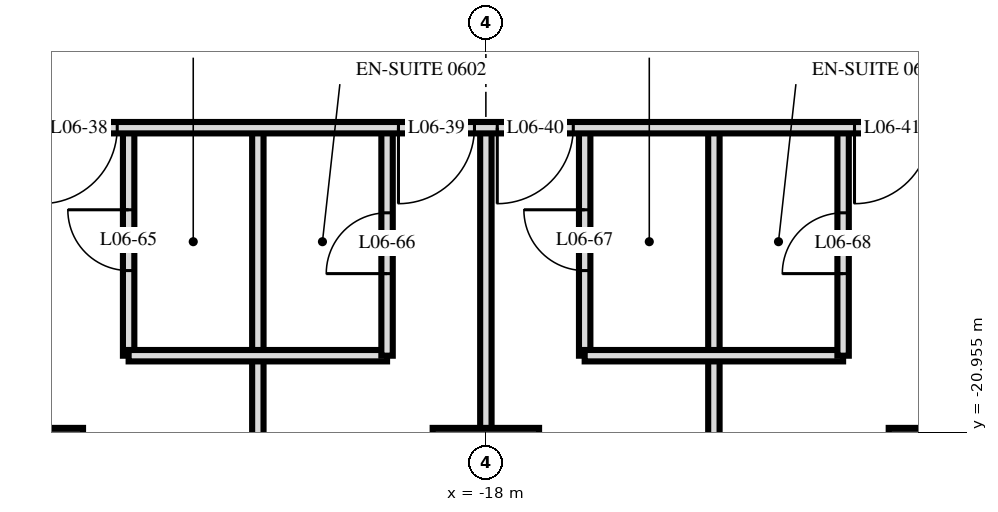
"""IFC4 building model, lengths in metres.
Left out: names, types, materials, properties, quantities, classifications, styles, units other than length and angle.
Written with IfcOpenShell. Run it as: python <this file> out.ifc"""

import sys

from ifc_helpers import new_model, si_unit, direction, frame, frame_2d, origin, origin_2d, place, context, subcontext, project, spatial, rectangle, extrude, element, fill, save


model = new_model("IFC4")
c1 = context("Model", 3, precision=1e-05, world=origin(), true_north=direction((0.0, 1.0)))
c2 = subcontext(c1, "Body", "Model", "MODEL_VIEW")
j1 = project(units=[si_unit("LENGTHUNIT", "METRE"), si_unit("PLANEANGLEUNIT", "RADIAN")], contexts=[c1])
p1 = place(None, origin())
s1 = spatial("IfcSite", under=j1, at=p1, CompositionType="ELEMENT")
p2 = place(p1, origin())
s2 = spatial("IfcBuilding", under=s1, at=p2, CompositionType="ELEMENT")
p3 = place(p2, frame((0.0, 0.0, 31.2)))
s3 = spatial("IfcBuildingStorey", under=s2, at=p3, CompositionType="ELEMENT", Elevation=31.2)
for number, where, z_axis, x_axis in (
    (1, (-24.0, -21.6, 0.0), (0.0, 0.0, 1.0), (1.0, 0.0, 0.0)),
    (2, (-18.0, -21.6, 0.0), (0.0, 0.0, 1.0), (1.0, 0.0, 0.0)),
    (3, (-12.0, -21.6, 0.0), (0.0, 0.0, 1.0), (1.0, 0.0, 0.0)),
):
    element("IfcColumn", number, at=place(p3, frame(where, z_axis=z_axis, x_axis=x_axis)), inside=s3, PredefinedType="COLUMN", context=c2, shape_type="SweptSolid", body=[
        extrude(rectangle(XDim=1.4, YDim=1.4, at=origin_2d()), origin(), (0.0, 0.0, 1.0), 3.6),
    ])
p4 = place(p3, frame((-13.3, -19.95, 0.0), z_axis=(0.0, 0.0, 1.0), x_axis=(0.0, 1.0, 0.0)))
e4 = element("IfcWall", 4, at=p4, inside=s3, PredefinedType="PARTITIONING", context=c2, shape_type="SweptSolid", body=[
    extrude(rectangle(XDim=3.0, YDim=0.15, at=frame_2d((1.5, 0.0))), origin(), (0.0, 0.0, 1.0), 3.32),
])
p5 = place(p4, frame((1.08, 0.0, 0.0)))
e5 = element("IfcOpeningElement", 5, at=p5, cuts=e4, PredefinedType="OPENING", context=c2, shape_type="SweptSolid", body=[
    extrude(rectangle(XDim=0.8, YDim=2.1, at=frame_2d((0.4, 1.05))), frame((0.0, 0.085, 0.0), z_axis=(0.0, -1.0, 0.0), x_axis=(1.0, 0.0, 0.0)), (0.0, 0.0, 1.0), 0.17),
])
p6 = place(p3, frame((-15.0, -29.22, 0.0), z_axis=(0.0, 0.0, 1.0), x_axis=(0.0, 1.0, 0.0)))
e6 = element("IfcWall", 6, at=p6, inside=s3, PredefinedType="PARTITIONING", context=c2, shape_type="SweptSolid", body=[
    extrude(rectangle(XDim=12.27, YDim=0.15, at=frame_2d((6.135, 0.0))), origin(), (0.0, 0.0, 1.0), 3.32),
])
p7 = place(p3, frame((-16.7, -19.95, 0.0), z_axis=(0.0, 0.0, 1.0), x_axis=(0.0, 1.0, 0.0)))
e7 = element("IfcWall", 7, at=p7, inside=s3, PredefinedType="PARTITIONING", context=c2, shape_type="SweptSolid", body=[
    extrude(rectangle(XDim=3.0, YDim=0.15, at=frame_2d((1.5, 0.0))), origin(), (0.0, 0.0, 1.0), 3.32),
])
p8 = place(p7, frame((1.12, 0.0, 0.0)))
e8 = element("IfcOpeningElement", 8, at=p8, cuts=e7, PredefinedType="OPENING", context=c2, shape_type="SweptSolid", body=[
    extrude(rectangle(XDim=0.8, YDim=2.1, at=frame_2d((0.4, 1.05))), frame((0.0, 0.085, 0.0), z_axis=(0.0, -1.0, 0.0), x_axis=(1.0, 0.0, 0.0)), (0.0, 0.0, 1.0), 0.17),
])
p9 = place(p3, frame((-18.0, -29.22, 0.0), z_axis=(0.0, 0.0, 1.0), x_axis=(0.0, 1.0, 0.0)))
e9 = element("IfcWall", 9, at=p9, inside=s3, PredefinedType="PARTITIONING", context=c2, shape_type="SweptSolid", body=[
    extrude(rectangle(XDim=12.27, YDim=0.15, at=frame_2d((6.135, 0.0))), origin(), (0.0, 0.0, 1.0), 3.32),
])
p10 = place(p3, frame((-19.3, -19.95, 0.0), z_axis=(0.0, 0.0, 1.0), x_axis=(0.0, 1.0, 0.0)))
e10 = element("IfcWall", 10, at=p10, inside=s3, PredefinedType="PARTITIONING", context=c2, shape_type="SweptSolid", body=[
    extrude(rectangle(XDim=3.0, YDim=0.15, at=frame_2d((1.5, 0.0))), origin(), (0.0, 0.0, 1.0), 3.32),
])
p11 = place(p10, frame((1.08, 0.0, 0.0)))
e11 = element("IfcOpeningElement", 11, at=p11, cuts=e10, PredefinedType="OPENING", context=c2, shape_type="SweptSolid", body=[
    extrude(rectangle(XDim=0.8, YDim=2.1, at=frame_2d((0.4, 1.05))), frame((0.0, 0.085, 0.0), z_axis=(0.0, -1.0, 0.0), x_axis=(1.0, 0.0, 0.0)), (0.0, 0.0, 1.0), 0.17),
])
p12 = place(p3, frame((-21.0, -29.22, 0.0), z_axis=(0.0, 0.0, 1.0), x_axis=(0.0, 1.0, 0.0)))
e12 = element("IfcWall", 12, at=p12, inside=s3, PredefinedType="PARTITIONING", context=c2, shape_type="SweptSolid", body=[
    extrude(rectangle(XDim=12.27, YDim=0.15, at=frame_2d((6.135, 0.0))), origin(), (0.0, 0.0, 1.0), 3.32),
])
p13 = place(p3, frame((-22.7, -19.95, 0.0), z_axis=(0.0, 0.0, 1.0), x_axis=(0.0, 1.0, 0.0)))
e13 = element("IfcWall", 13, at=p13, inside=s3, PredefinedType="PARTITIONING", context=c2, shape_type="SweptSolid", body=[
    extrude(rectangle(XDim=3.0, YDim=0.15, at=frame_2d((1.5, 0.0))), origin(), (0.0, 0.0, 1.0), 3.32),
])
p14 = place(p13, frame((1.12, 0.0, 0.0)))
e14 = element("IfcOpeningElement", 14, at=p14, cuts=e13, PredefinedType="OPENING", context=c2, shape_type="SweptSolid", body=[
    extrude(rectangle(XDim=0.8, YDim=2.1, at=frame_2d((0.4, 1.05))), frame((0.0, 0.085, 0.0), z_axis=(0.0, -1.0, 0.0), x_axis=(1.0, 0.0, 0.0)), (0.0, 0.0, 1.0), 0.17),
])
for number, where, z_axis, x_axis in (
    (15, (-22.7, -19.95, 0.0), (0.0, 0.0, 1.0), (1.0, 0.0, 0.0)),
    (16, (-16.7, -19.95, 0.0), (0.0, 0.0, 1.0), (1.0, 0.0, 0.0)),
):
    element("IfcWall", number, at=place(p3, frame(where, z_axis=z_axis, x_axis=x_axis)), inside=s3, PredefinedType="PARTITIONING", context=c2, shape_type="SweptSolid", body=[
        extrude(rectangle(XDim=3.4, YDim=0.15, at=frame_2d((1.7, 0.0))), origin(), (0.0, 0.0, 1.0), 3.32),
    ])
p15 = place(p3, frame((-33.12, -16.95, 0.0), z_axis=(0.0, 0.0, 1.0), x_axis=(1.0, 0.0, 0.0)))
e17 = element("IfcWall", 17, at=p15, inside=s3, PredefinedType="PARTITIONING", context=c2, shape_type="SweptSolid", body=[
    extrude(rectangle(XDim=66.24, YDim=0.15, at=frame_2d((33.12, 0.0))), origin(), (0.0, 0.0, 1.0), 3.32),
])
p16 = place(p15, frame((9.27, 0.0, 0.0)))
e18 = element("IfcOpeningElement", 18, at=p16, cuts=e17, PredefinedType="OPENING", context=c2, shape_type="SweptSolid", body=[
    extrude(rectangle(XDim=1.0, YDim=2.1, at=frame_2d((0.5, 1.05))), frame((0.0, 0.085, 0.0), z_axis=(0.0, -1.0, 0.0), x_axis=(1.0, 0.0, 0.0)), (0.0, 0.0, 1.0), 0.17),
])
p17 = place(p15, frame((13.97, 0.0, 0.0)))
e19 = element("IfcOpeningElement", 19, at=p17, cuts=e17, PredefinedType="OPENING", context=c2, shape_type="SweptSolid", body=[
    extrude(rectangle(XDim=1.0, YDim=2.1, at=frame_2d((0.5, 1.05))), frame((0.0, 0.085, 0.0), z_axis=(0.0, -1.0, 0.0), x_axis=(1.0, 0.0, 0.0)), (0.0, 0.0, 1.0), 0.17),
])
p18 = place(p15, frame((15.27, 0.0, 0.0)))
e20 = element("IfcOpeningElement", 20, at=p18, cuts=e17, PredefinedType="OPENING", context=c2, shape_type="SweptSolid", body=[
    extrude(rectangle(XDim=1.0, YDim=2.1, at=frame_2d((0.5, 1.05))), frame((0.0, 0.085, 0.0), z_axis=(0.0, -1.0, 0.0), x_axis=(1.0, 0.0, 0.0)), (0.0, 0.0, 1.0), 0.17),
])
p19 = place(p15, frame((19.97, 0.0, 0.0)))
e21 = element("IfcOpeningElement", 21, at=p19, cuts=e17, PredefinedType="OPENING", context=c2, shape_type="SweptSolid", body=[
    extrude(rectangle(XDim=1.0, YDim=2.1, at=frame_2d((0.5, 1.05))), frame((0.0, 0.085, 0.0), z_axis=(0.0, -1.0, 0.0), x_axis=(1.0, 0.0, 0.0)), (0.0, 0.0, 1.0), 0.17),
])
p20 = place(p15, frame((22.27, 0.0, 0.0)))
e22 = element("IfcOpeningElement", 22, at=p20, cuts=e17, PredefinedType="OPENING", context=c2, shape_type="SweptSolid", body=[
    extrude(rectangle(XDim=1.0, YDim=2.1, at=frame_2d((0.5, 1.05))), frame((0.0, 0.085, 0.0), z_axis=(0.0, -1.0, 0.0), x_axis=(1.0, 0.0, 0.0)), (0.0, 0.0, 1.0), 0.17),
])
p21 = place(p15, frame((28.97, 0.0, 0.0)))
e23 = element("IfcOpeningElement", 23, at=p21, cuts=e17, PredefinedType="OPENING", context=c2, shape_type="SweptSolid", body=[
    extrude(rectangle(XDim=1.0, YDim=2.1, at=frame_2d((0.5, 1.05))), frame((0.0, 0.085, 0.0), z_axis=(0.0, -1.0, 0.0), x_axis=(1.0, 0.0, 0.0)), (0.0, 0.0, 1.0), 0.17),
])
p22 = place(p15, frame((30.27, 0.0, 0.0)))
e24 = element("IfcOpeningElement", 24, at=p22, cuts=e17, PredefinedType="OPENING", context=c2, shape_type="SweptSolid", body=[
    extrude(rectangle(XDim=1.0, YDim=2.1, at=frame_2d((0.5, 1.05))), frame((0.0, 0.085, 0.0), z_axis=(0.0, -1.0, 0.0), x_axis=(1.0, 0.0, 0.0)), (0.0, 0.0, 1.0), 0.17),
])
p23 = place(p15, frame((34.97, 0.0, 0.0)))
e25 = element("IfcOpeningElement", 25, at=p23, cuts=e17, PredefinedType="OPENING", context=c2, shape_type="SweptSolid", body=[
    extrude(rectangle(XDim=1.0, YDim=2.1, at=frame_2d((0.5, 1.05))), frame((0.0, 0.085, 0.0), z_axis=(0.0, -1.0, 0.0), x_axis=(1.0, 0.0, 0.0)), (0.0, 0.0, 1.0), 0.17),
])
p24 = place(p15, frame((36.27, 0.0, 0.0)))
e26 = element("IfcOpeningElement", 26, at=p24, cuts=e17, PredefinedType="OPENING", context=c2, shape_type="SweptSolid", body=[
    extrude(rectangle(XDim=1.0, YDim=2.1, at=frame_2d((0.5, 1.05))), frame((0.0, 0.085, 0.0), z_axis=(0.0, -1.0, 0.0), x_axis=(1.0, 0.0, 0.0)), (0.0, 0.0, 1.0), 0.17),
])
p25 = place(p15, frame((40.97, 0.0, 0.0)))
e27 = element("IfcOpeningElement", 27, at=p25, cuts=e17, PredefinedType="OPENING", context=c2, shape_type="SweptSolid", body=[
    extrude(rectangle(XDim=1.0, YDim=2.1, at=frame_2d((0.5, 1.05))), frame((0.0, 0.085, 0.0), z_axis=(0.0, -1.0, 0.0), x_axis=(1.0, 0.0, 0.0)), (0.0, 0.0, 1.0), 0.17),
])
p26 = place(p15, frame((42.27, 0.0, 0.0)))
e28 = element("IfcOpeningElement", 28, at=p26, cuts=e17, PredefinedType="OPENING", context=c2, shape_type="SweptSolid", body=[
    extrude(rectangle(XDim=1.0, YDim=2.1, at=frame_2d((0.5, 1.05))), frame((0.0, 0.085, 0.0), z_axis=(0.0, -1.0, 0.0), x_axis=(1.0, 0.0, 0.0)), (0.0, 0.0, 1.0), 0.17),
])
p27 = place(p15, frame((46.97, 0.0, 0.0)))
e29 = element("IfcOpeningElement", 29, at=p27, cuts=e17, PredefinedType="OPENING", context=c2, shape_type="SweptSolid", body=[
    extrude(rectangle(XDim=1.0, YDim=2.1, at=frame_2d((0.5, 1.05))), frame((0.0, 0.085, 0.0), z_axis=(0.0, -1.0, 0.0), x_axis=(1.0, 0.0, 0.0)), (0.0, 0.0, 1.0), 0.17),
])
p28 = place(p15, frame((48.27, 0.0, 0.0)))
e30 = element("IfcOpeningElement", 30, at=p28, cuts=e17, PredefinedType="OPENING", context=c2, shape_type="SweptSolid", body=[
    extrude(rectangle(XDim=1.0, YDim=2.1, at=frame_2d((0.5, 1.05))), frame((0.0, 0.085, 0.0), z_axis=(0.0, -1.0, 0.0), x_axis=(1.0, 0.0, 0.0)), (0.0, 0.0, 1.0), 0.17),
])
p29 = place(p15, frame((52.97, 0.0, 0.0)))
e31 = element("IfcOpeningElement", 31, at=p29, cuts=e17, PredefinedType="OPENING", context=c2, shape_type="SweptSolid", body=[
    extrude(rectangle(XDim=1.0, YDim=2.1, at=frame_2d((0.5, 1.05))), frame((0.0, 0.085, 0.0), z_axis=(0.0, -1.0, 0.0), x_axis=(1.0, 0.0, 0.0)), (0.0, 0.0, 1.0), 0.17),
])
p30 = place(p15, frame((54.27, 0.0, 0.0)))
e32 = element("IfcOpeningElement", 32, at=p30, cuts=e17, PredefinedType="OPENING", context=c2, shape_type="SweptSolid", body=[
    extrude(rectangle(XDim=1.0, YDim=2.1, at=frame_2d((0.5, 1.05))), frame((0.0, 0.085, 0.0), z_axis=(0.0, -1.0, 0.0), x_axis=(1.0, 0.0, 0.0)), (0.0, 0.0, 1.0), 0.17),
])
p31 = place(p15, frame((4.4, 0.0, 0.0)))
e33 = element("IfcOpeningElement", 33, at=p31, cuts=e17, PredefinedType="OPENING", context=c2, shape_type="SweptSolid", body=[
    extrude(rectangle(XDim=1.0, YDim=2.1, at=frame_2d((0.5, 1.05))), frame((0.0, 0.085, 0.0), z_axis=(0.0, -1.0, 0.0), x_axis=(1.0, 0.0, 0.0)), (0.0, 0.0, 1.0), 0.17),
])
p32 = place(p15, frame((60.8, 0.0, 0.0)))
e34 = element("IfcOpeningElement", 34, at=p32, cuts=e17, PredefinedType="OPENING", context=c2, shape_type="SweptSolid", body=[
    extrude(rectangle(XDim=1.0, YDim=2.1, at=frame_2d((0.5, 1.05))), frame((0.0, 0.085, 0.0), z_axis=(0.0, -1.0, 0.0), x_axis=(1.0, 0.0, 0.0)), (0.0, 0.0, 1.0), 0.17),
])
p33 = place(p16, frame((0.5, 0.0, 0.0), z_axis=(0.0, 0.0, 1.0), x_axis=(-1.0, 0.0, 0.0)))
e35 = element("IfcDoor", 35, at=p33, inside=s3, OperationType="SINGLE_SWING_LEFT", PredefinedType="DOOR", context=c2, shape_type="SweptSolid", body=[
    extrude(rectangle(XDim=1.0, YDim=2.1, at=frame_2d((0.0, 1.05))), frame((0.0, -0.025, 0.0), z_axis=(0.0, 1.0, 0.0), x_axis=(-1.0, 0.0, 0.0)), (0.0, 0.0, 1.0), 0.05),
])
fill(e18, e35)
p34 = place(p17, frame((0.5, 0.0, 0.0), z_axis=(0.0, 0.0, 1.0), x_axis=(-1.0, 0.0, 0.0)))
e36 = element("IfcDoor", 36, at=p34, inside=s3, OperationType="SINGLE_SWING_LEFT", PredefinedType="DOOR", context=c2, shape_type="SweptSolid", body=[
    extrude(rectangle(XDim=1.0, YDim=2.1, at=frame_2d((0.0, 1.05))), frame((0.0, -0.025, 0.0), z_axis=(0.0, 1.0, 0.0), x_axis=(-1.0, 0.0, 0.0)), (0.0, 0.0, 1.0), 0.05),
])
fill(e19, e36)
p35 = place(p18, frame((0.5, 0.0, 0.0), z_axis=(0.0, 0.0, 1.0), x_axis=(-1.0, 0.0, 0.0)))
e37 = element("IfcDoor", 37, at=p35, inside=s3, OperationType="SINGLE_SWING_LEFT", PredefinedType="DOOR", context=c2, shape_type="SweptSolid", body=[
    extrude(rectangle(XDim=1.0, YDim=2.1, at=frame_2d((0.0, 1.05))), frame((0.0, -0.025, 0.0), z_axis=(0.0, 1.0, 0.0), x_axis=(-1.0, 0.0, 0.0)), (0.0, 0.0, 1.0), 0.05),
])
fill(e20, e37)
p36 = place(p19, frame((0.5, 0.0, 0.0), z_axis=(0.0, 0.0, 1.0), x_axis=(-1.0, 0.0, 0.0)))
e38 = element("IfcDoor", 38, at=p36, inside=s3, OperationType="SINGLE_SWING_LEFT", PredefinedType="DOOR", context=c2, shape_type="SweptSolid", body=[
    extrude(rectangle(XDim=1.0, YDim=2.1, at=frame_2d((0.0, 1.05))), frame((0.0, -0.025, 0.0), z_axis=(0.0, 1.0, 0.0), x_axis=(-1.0, 0.0, 0.0)), (0.0, 0.0, 1.0), 0.05),
])
fill(e21, e38)
p37 = place(p14, origin())
e39 = element("IfcDoor", 39, at=p37, inside=s3, OperationType="SINGLE_SWING_LEFT", PredefinedType="DOOR", context=c2, shape_type="SweptSolid", body=[
    extrude(rectangle(XDim=0.8, YDim=2.1, at=frame_2d((0.4, 1.05))), frame((0.0, 0.025, 0.0), z_axis=(0.0, -1.0, 0.0), x_axis=(1.0, 0.0, 0.0)), (0.0, 0.0, 1.0), 0.05),
])
fill(e14, e39)
p38 = place(p11, origin())
e40 = element("IfcDoor", 40, at=p38, inside=s3, OperationType="SINGLE_SWING_RIGHT", PredefinedType="DOOR", context=c2, shape_type="SweptSolid", body=[
    extrude(rectangle(XDim=0.8, YDim=2.1, at=frame_2d((0.4, 1.05))), frame((0.0, 0.025, 0.0), z_axis=(0.0, -1.0, 0.0), x_axis=(1.0, 0.0, 0.0)), (0.0, 0.0, 1.0), 0.05),
])
fill(e11, e40)
p39 = place(p8, origin())
e41 = element("IfcDoor", 41, at=p39, inside=s3, OperationType="SINGLE_SWING_LEFT", PredefinedType="DOOR", context=c2, shape_type="SweptSolid", body=[
    extrude(rectangle(XDim=0.8, YDim=2.1, at=frame_2d((0.4, 1.05))), frame((0.0, 0.025, 0.0), z_axis=(0.0, -1.0, 0.0), x_axis=(1.0, 0.0, 0.0)), (0.0, 0.0, 1.0), 0.05),
])
fill(e8, e41)
p40 = place(p5, origin())
e42 = element("IfcDoor", 42, at=p40, inside=s3, OperationType="SINGLE_SWING_RIGHT", PredefinedType="DOOR", context=c2, shape_type="SweptSolid", body=[
    extrude(rectangle(XDim=0.8, YDim=2.1, at=frame_2d((0.4, 1.05))), frame((0.0, 0.025, 0.0), z_axis=(0.0, -1.0, 0.0), x_axis=(1.0, 0.0, 0.0)), (0.0, 0.0, 1.0), 0.05),
])
fill(e5, e42)
save(model, sys.argv[1])
